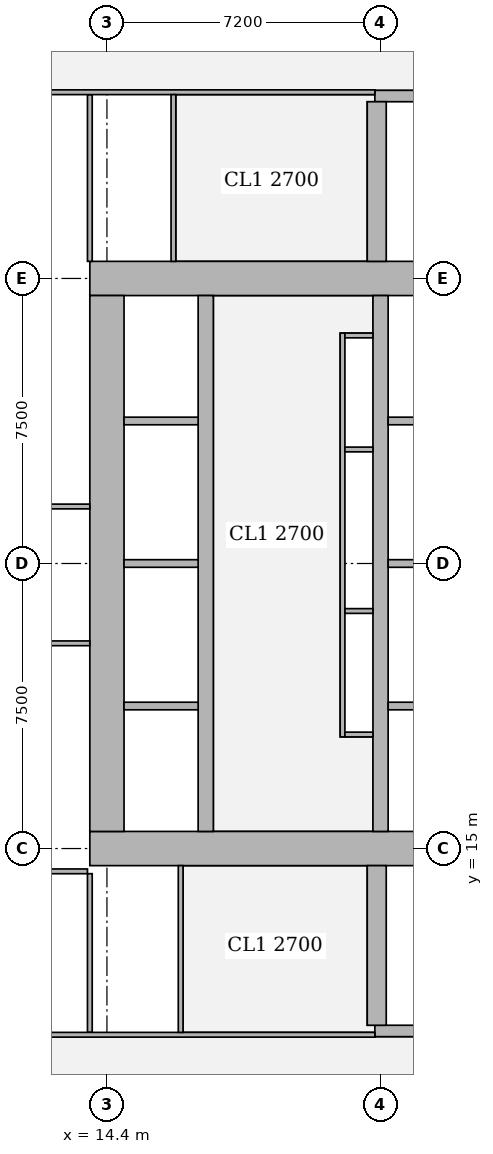
"""IFC4 building model, lengths in metres.
Left out: names, types, materials, properties, quantities, classifications, styles, units other than length and angle.
Written with IfcOpenShell. Run it as: python <this file> out.ifc"""

import sys

from ifc_helpers import new_model, si_unit, direction, frame, frame_2d, origin, place, context, subcontext, project, spatial, rectangle, extrude, element, fill, save


model = new_model("IFC4")
c1 = context("Model", 3, precision=1e-05, world=origin(), true_north=direction((0.0, 1.0)))
c2 = subcontext(c1, "Body", "Model", "MODEL_VIEW")
j1 = project(units=[si_unit("LENGTHUNIT", "METRE"), si_unit("PLANEANGLEUNIT", "RADIAN")], contexts=[c1])
p1 = place(None, origin())
s1 = spatial("IfcSite", under=j1, at=p1, CompositionType="ELEMENT")
p2 = place(p1, origin())
s2 = spatial("IfcBuilding", under=s1, at=p2, CompositionType="ELEMENT")
p3 = place(p2, frame((0.0, 0.0, 31.25)))
s3 = spatial("IfcBuildingStorey", under=s2, at=p3, CompositionType="ELEMENT", Elevation=31.25)
p4 = place(p3, frame((13.95, 15.0, 0.0), z_axis=(0.0, 0.0, 1.0), x_axis=(1.0, 0.0, 0.0)))
e1 = element("IfcWall", 1, at=p4, inside=s3, PredefinedType="SHEAR", context=c2, shape_type="SweptSolid", body=[
    extrude(rectangle(XDim=15.3, YDim=0.9, at=frame_2d((7.65, 0.0))), origin(), (0.0, 0.0, 1.0), 3.75),
])
p5 = place(p4, frame((4.45, 0.0, 0.0)))
e2 = element("IfcOpeningElement", 2, at=p5, cuts=e1, PredefinedType="OPENING", context=c2, shape_type="SweptSolid", body=[
    extrude(rectangle(XDim=1.8, YDim=2.1, at=frame_2d((0.9, 1.05))), frame((0.0, 0.46, 0.0), z_axis=(0.0, -1.0, 0.0), x_axis=(1.0, 0.0, 0.0)), (0.0, 0.0, 1.0), 0.92),
])
p6 = place(p4, frame((10.7, 0.0, 0.0)))
e3 = element("IfcOpeningElement", 3, at=p6, cuts=e1, PredefinedType="OPENING", context=c2, shape_type="SweptSolid", body=[
    extrude(rectangle(XDim=1.1, YDim=2.1, at=frame_2d((0.55, 1.05))), frame((0.0, 0.46, 0.0), z_axis=(0.0, -1.0, 0.0), x_axis=(1.0, 0.0, 0.0)), (0.0, 0.0, 1.0), 0.92),
])
p7 = place(p3, frame((13.95, 30.0, 0.0), z_axis=(0.0, 0.0, 1.0), x_axis=(1.0, 0.0, 0.0)))
e4 = element("IfcWall", 4, at=p7, inside=s3, PredefinedType="SHEAR", context=c2, shape_type="SweptSolid", body=[
    extrude(rectangle(XDim=15.3, YDim=0.9, at=frame_2d((7.65, 0.0))), origin(), (0.0, 0.0, 1.0), 3.75),
])
p8 = place(p7, frame((4.45, 0.0, 0.0)))
e5 = element("IfcOpeningElement", 5, at=p8, cuts=e4, PredefinedType="OPENING", context=c2, shape_type="SweptSolid", body=[
    extrude(rectangle(XDim=1.8, YDim=2.1, at=frame_2d((0.9, 1.05))), frame((0.0, 0.46, 0.0), z_axis=(0.0, -1.0, 0.0), x_axis=(1.0, 0.0, 0.0)), (0.0, 0.0, 1.0), 0.92),
])
p9 = place(p7, frame((10.7, 0.0, 0.0)))
e6 = element("IfcOpeningElement", 6, at=p9, cuts=e4, PredefinedType="OPENING", context=c2, shape_type="SweptSolid", body=[
    extrude(rectangle(XDim=1.1, YDim=2.1, at=frame_2d((0.55, 1.05))), frame((0.0, 0.46, 0.0), z_axis=(0.0, -1.0, 0.0), x_axis=(1.0, 0.0, 0.0)), (0.0, 0.0, 1.0), 0.92),
])
p10 = place(p3, frame((14.4, 15.45, 0.0), z_axis=(0.0, 0.0, 1.0), x_axis=(0.0, 1.0, 0.0)))
e7 = element("IfcWall", 7, at=p10, inside=s3, PredefinedType="SHEAR", context=c2, shape_type="SweptSolid", body=[
    extrude(rectangle(XDim=14.1, YDim=0.9, at=frame_2d((7.05, 0.0))), origin(), (0.0, 0.0, 1.0), 3.75),
])
p11 = place(p3, frame((17.0, 15.45, 0.0), z_axis=(0.0, 0.0, 1.0), x_axis=(0.0, 1.0, 0.0)))
e8 = element("IfcWall", 8, at=p11, inside=s3, PredefinedType="SHEAR", context=c2, shape_type="SweptSolid", body=[
    extrude(rectangle(XDim=14.1, YDim=0.4, at=frame_2d((7.05, 0.0))), origin(), (0.0, 0.0, 1.0), 3.75),
])
p12 = place(p11, frame((0.875, 0.0, 0.0)))
e9 = element("IfcOpeningElement", 9, at=p12, cuts=e8, PredefinedType="OPENING", context=c2, shape_type="SweptSolid", body=[
    extrude(rectangle(XDim=1.1, YDim=2.1, at=frame_2d((0.55, 1.05))), frame((0.0, 0.21, 0.0), z_axis=(0.0, -1.0, 0.0), x_axis=(1.0, 0.0, 0.0)), (0.0, 0.0, 1.0), 0.42),
])
p13 = place(p11, frame((4.625, 0.0, 0.0)))
e10 = element("IfcOpeningElement", 10, at=p13, cuts=e8, PredefinedType="OPENING", context=c2, shape_type="SweptSolid", body=[
    extrude(rectangle(XDim=1.1, YDim=2.1, at=frame_2d((0.55, 1.05))), frame((0.0, 0.21, 0.0), z_axis=(0.0, -1.0, 0.0), x_axis=(1.0, 0.0, 0.0)), (0.0, 0.0, 1.0), 0.42),
])
p14 = place(p11, frame((8.375, 0.0, 0.0)))
e11 = element("IfcOpeningElement", 11, at=p14, cuts=e8, PredefinedType="OPENING", context=c2, shape_type="SweptSolid", body=[
    extrude(rectangle(XDim=1.1, YDim=2.1, at=frame_2d((0.55, 1.05))), frame((0.0, 0.21, 0.0), z_axis=(0.0, -1.0, 0.0), x_axis=(1.0, 0.0, 0.0)), (0.0, 0.0, 1.0), 0.42),
])
p15 = place(p11, frame((12.125, 0.0, 0.0)))
e12 = element("IfcOpeningElement", 12, at=p15, cuts=e8, PredefinedType="OPENING", context=c2, shape_type="SweptSolid", body=[
    extrude(rectangle(XDim=1.1, YDim=2.1, at=frame_2d((0.55, 1.05))), frame((0.0, 0.21, 0.0), z_axis=(0.0, -1.0, 0.0), x_axis=(1.0, 0.0, 0.0)), (0.0, 0.0, 1.0), 0.42),
])
p16 = place(p3, frame((21.6, 15.45, 0.0), z_axis=(0.0, 0.0, 1.0), x_axis=(0.0, 1.0, 0.0)))
e13 = element("IfcWall", 13, at=p16, inside=s3, PredefinedType="SHEAR", context=c2, shape_type="SweptSolid", body=[
    extrude(rectangle(XDim=14.1, YDim=0.4, at=frame_2d((7.05, 0.0))), origin(), (0.0, 0.0, 1.0), 3.75),
])
p17 = place(p3, frame((21.45, 10.2, 0.0), z_axis=(0.0, 0.0, 1.0), x_axis=(1.0, 0.0, 0.0)))
e14 = element("IfcWall", 14, at=p17, inside=s3, PredefinedType="SHEAR", context=c2, shape_type="SweptSolid", body=[
    extrude(rectangle(XDim=7.5, YDim=0.3, at=frame_2d((3.75, 0.0))), origin(), (0.0, 0.0, 1.0), 3.75),
])
p18 = place(p17, frame((0.5, 0.0, 0.0)))
e15 = element("IfcOpeningElement", 15, at=p18, cuts=e14, PredefinedType="OPENING", context=c2, shape_type="SweptSolid", body=[
    extrude(rectangle(XDim=1.1, YDim=2.1, at=frame_2d((0.55, 1.05))), frame((0.0, 0.16, 0.0), z_axis=(0.0, -1.0, 0.0), x_axis=(1.0, 0.0, 0.0)), (0.0, 0.0, 1.0), 0.32),
])
p19 = place(p3, frame((21.5, 10.35, 0.0), z_axis=(0.0, 0.0, 1.0), x_axis=(0.0, 1.0, 0.0)))
e16 = element("IfcWall", 16, at=p19, inside=s3, PredefinedType="SHEAR", context=c2, shape_type="SweptSolid", body=[
    extrude(rectangle(XDim=4.2, YDim=0.5, at=frame_2d((2.1, 0.0))), origin(), (0.0, 0.0, 1.0), 3.75),
])
p20 = place(p3, frame((21.45, 34.8, 0.0), z_axis=(0.0, 0.0, 1.0), x_axis=(1.0, 0.0, 0.0)))
e17 = element("IfcWall", 17, at=p20, inside=s3, PredefinedType="SHEAR", context=c2, shape_type="SweptSolid", body=[
    extrude(rectangle(XDim=7.5, YDim=0.3, at=frame_2d((3.75, 0.0))), origin(), (0.0, 0.0, 1.0), 3.75),
])
p21 = place(p20, frame((0.5, 0.0, 0.0)))
e18 = element("IfcOpeningElement", 18, at=p21, cuts=e17, PredefinedType="OPENING", context=c2, shape_type="SweptSolid", body=[
    extrude(rectangle(XDim=1.1, YDim=2.1, at=frame_2d((0.55, 1.05))), frame((0.0, 0.16, 0.0), z_axis=(0.0, -1.0, 0.0), x_axis=(1.0, 0.0, 0.0)), (0.0, 0.0, 1.0), 0.32),
])
p22 = place(p3, frame((21.5, 30.45, 0.0), z_axis=(0.0, 0.0, 1.0), x_axis=(0.0, 1.0, 0.0)))
e19 = element("IfcWall", 19, at=p22, inside=s3, PredefinedType="SHEAR", context=c2, shape_type="SweptSolid", body=[
    extrude(rectangle(XDim=4.2, YDim=0.5, at=frame_2d((2.1, 0.0))), origin(), (0.0, 0.0, 1.0), 3.75),
])
p23 = place(p3, frame((10.163, 14.4, 0.0), z_axis=(0.0, 0.0, 1.0), x_axis=(1.0, 0.0, 0.0)))
e20 = element("IfcWall", 20, at=p23, inside=s3, PredefinedType="PARTITIONING", context=c2, shape_type="SweptSolid", body=[
    extrude(rectangle(XDim=3.725, YDim=0.125, at=frame_2d((1.862, 0.0))), origin(), (0.0, 0.0, 1.0), 3.5),
])
for number, where, z_axis, x_axis in (
    (21, (10.163, 20.4, 0.0), (0.0, 0.0, 1.0), (1.0, 0.0, 0.0)),
    (22, (10.163, 24.0, 0.0), (0.0, 0.0, 1.0), (1.0, 0.0, 0.0)),
):
    element("IfcWall", number, at=place(p3, frame(where, z_axis=z_axis, x_axis=x_axis)), inside=s3, PredefinedType="PARTITIONING", context=c2, shape_type="SweptSolid", body=[
        extrude(rectangle(XDim=3.787, YDim=0.125, at=frame_2d((1.894, 0.0))), origin(), (0.0, 0.0, 1.0), 3.5),
    ])
p24 = place(p3, frame((13.95, 10.163, 0.0), z_axis=(0.0, 0.0, 1.0), x_axis=(0.0, 1.0, 0.0)))
e23 = element("IfcWall", 23, at=p24, inside=s3, PredefinedType="PARTITIONING", context=c2, shape_type="SweptSolid", body=[
    extrude(rectangle(XDim=4.175, YDim=0.125, at=frame_2d((2.087, 0.0))), origin(), (0.0, 0.0, 1.0), 3.5),
])
p25 = place(p3, frame((13.95, 30.45, 0.0), z_axis=(0.0, 0.0, 1.0), x_axis=(0.0, 1.0, 0.0)))
e24 = element("IfcWall", 24, at=p25, inside=s3, PredefinedType="PARTITIONING", context=c2, shape_type="SweptSolid", body=[
    extrude(rectangle(XDim=4.387, YDim=0.125, at=frame_2d((2.193, 0.0))), origin(), (0.0, 0.0, 1.0), 3.5),
])
p26 = place(p3, frame((10.163, 10.1, 0.0), z_axis=(0.0, 0.0, 1.0), x_axis=(1.0, 0.0, 0.0)))
e25 = element("IfcWall", 25, at=p26, inside=s3, PredefinedType="PARTITIONING", context=c2, shape_type="SweptSolid", body=[
    extrude(rectangle(XDim=11.287, YDim=0.125, at=frame_2d((5.644, 0.0))), origin(), (0.0, 0.0, 1.0), 3.5),
])
p27 = place(p26, frame((7.832, 0.0, 0.0)))
e26 = element("IfcOpeningElement", 26, at=p27, cuts=e25, PredefinedType="OPENING", context=c2, shape_type="SweptSolid", body=[
    extrude(rectangle(XDim=1.8, YDim=2.1, at=frame_2d((0.9, 1.05))), frame((0.0, 0.073, 0.0), z_axis=(0.0, -1.0, 0.0), x_axis=(1.0, 0.0, 0.0)), (0.0, 0.0, 1.0), 0.145),
])
p28 = place(p3, frame((10.163, 34.9, 0.0), z_axis=(0.0, 0.0, 1.0), x_axis=(1.0, 0.0, 0.0)))
e27 = element("IfcWall", 27, at=p28, inside=s3, PredefinedType="PARTITIONING", context=c2, shape_type="SweptSolid", body=[
    extrude(rectangle(XDim=11.287, YDim=0.125, at=frame_2d((5.644, 0.0))), origin(), (0.0, 0.0, 1.0), 3.5),
])
p29 = place(p28, frame((7.737, 0.0, 0.0)))
e28 = element("IfcOpeningElement", 28, at=p29, cuts=e27, PredefinedType="OPENING", context=c2, shape_type="SweptSolid", body=[
    extrude(rectangle(XDim=1.8, YDim=2.1, at=frame_2d((0.9, 1.05))), frame((0.0, 0.073, 0.0), z_axis=(0.0, -1.0, 0.0), x_axis=(1.0, 0.0, 0.0)), (0.0, 0.0, 1.0), 0.145),
])
p30 = place(p3, frame((16.34, 10.163, 0.0), z_axis=(0.0, 0.0, 1.0), x_axis=(0.0, 1.0, 0.0)))
e29 = element("IfcWall", 29, at=p30, inside=s3, PredefinedType="PARTITIONING", context=c2, shape_type="SweptSolid", body=[
    extrude(rectangle(XDim=4.387, YDim=0.125, at=frame_2d((2.193, 0.0))), origin(), (0.0, 0.0, 1.0), 3.5),
])
p31 = place(p30, frame((1.637, 0.0, 0.0)))
e30 = element("IfcOpeningElement", 30, at=p31, cuts=e29, PredefinedType="OPENING", context=c2, shape_type="SweptSolid", body=[
    extrude(rectangle(XDim=1.0, YDim=2.1, at=frame_2d((0.5, 1.05))), frame((0.0, 0.073, 0.0), z_axis=(0.0, -1.0, 0.0), x_axis=(1.0, 0.0, 0.0)), (0.0, 0.0, 1.0), 0.145),
])
p32 = place(p3, frame((16.15, 30.45, 0.0), z_axis=(0.0, 0.0, 1.0), x_axis=(0.0, 1.0, 0.0)))
e31 = element("IfcWall", 31, at=p32, inside=s3, PredefinedType="PARTITIONING", context=c2, shape_type="SweptSolid", body=[
    extrude(rectangle(XDim=4.387, YDim=0.125, at=frame_2d((2.193, 0.0))), origin(), (0.0, 0.0, 1.0), 3.5),
])
p33 = place(p32, frame((1.75, 0.0, 0.0)))
e32 = element("IfcOpeningElement", 32, at=p33, cuts=e31, PredefinedType="OPENING", context=c2, shape_type="SweptSolid", body=[
    extrude(rectangle(XDim=1.0, YDim=2.1, at=frame_2d((0.5, 1.05))), frame((0.0, 0.073, 0.0), z_axis=(0.0, -1.0, 0.0), x_axis=(1.0, 0.0, 0.0)), (0.0, 0.0, 1.0), 0.145),
])
p34 = place(p3, frame((20.6, 17.938, 0.0), z_axis=(0.0, 0.0, 1.0), x_axis=(0.0, 1.0, 0.0)))
e33 = element("IfcWall", 33, at=p34, inside=s3, PredefinedType="PARTITIONING", context=c2, shape_type="SweptSolid", body=[
    extrude(rectangle(XDim=10.624, YDim=0.125, at=frame_2d((5.312, 0.0))), origin(), (0.0, 0.0, 1.0), 3.5),
])
p35 = place(p34, frame((1.187, 0.0, 0.0)))
e34 = element("IfcOpeningElement", 34, at=p35, cuts=e33, PredefinedType="OPENING", context=c2, shape_type="SweptSolid", body=[
    extrude(rectangle(XDim=1.0, YDim=2.1, at=frame_2d((0.5, 1.05))), frame((0.0, 0.073, 0.0), z_axis=(0.0, -1.0, 0.0), x_axis=(1.0, 0.0, 0.0)), (0.0, 0.0, 1.0), 0.145),
])
p36 = place(p34, frame((4.937, 0.0, 0.0)))
e35 = element("IfcOpeningElement", 35, at=p36, cuts=e33, PredefinedType="OPENING", context=c2, shape_type="SweptSolid", body=[
    extrude(rectangle(XDim=1.0, YDim=2.1, at=frame_2d((0.5, 1.05))), frame((0.0, 0.073, 0.0), z_axis=(0.0, -1.0, 0.0), x_axis=(1.0, 0.0, 0.0)), (0.0, 0.0, 1.0), 0.145),
])
p37 = place(p34, frame((8.562, 0.0, 0.0)))
e36 = element("IfcOpeningElement", 36, at=p37, cuts=e33, PredefinedType="OPENING", context=c2, shape_type="SweptSolid", body=[
    extrude(rectangle(XDim=1.0, YDim=2.1, at=frame_2d((0.5, 1.05))), frame((0.0, 0.073, 0.0), z_axis=(0.0, -1.0, 0.0), x_axis=(1.0, 0.0, 0.0)), (0.0, 0.0, 1.0), 0.145),
])
for number, where, z_axis, x_axis in (
    (37, (20.663, 18.0, 0.0), (0.0, 0.0, 1.0), (1.0, 0.0, 0.0)),
    (38, (20.663, 28.5, 0.0), (0.0, 0.0, 1.0), (1.0, 0.0, 0.0)),
    (39, (20.663, 21.25, 0.0), (0.0, 0.0, 1.0), (1.0, 0.0, 0.0)),
    (40, (20.663, 25.5, 0.0), (0.0, 0.0, 1.0), (1.0, 0.0, 0.0)),
):
    element("IfcWall", number, at=place(p3, frame(where, z_axis=z_axis, x_axis=x_axis)), inside=s3, PredefinedType="PARTITIONING", context=c2, shape_type="SweptSolid", body=[
        extrude(rectangle(XDim=0.737, YDim=0.125, at=frame_2d((0.368, 0.0))), origin(), (0.0, 0.0, 1.0), 3.5),
    ])
p38 = place(p3, frame((14.85, 18.75, 0.0), z_axis=(0.0, 0.0, 1.0), x_axis=(1.0, 0.0, 0.0)))
e41 = element("IfcWall", 41, at=p38, inside=s3, PredefinedType="SOLIDWALL", context=c2, shape_type="SweptSolid", body=[
    extrude(rectangle(XDim=1.95, YDim=0.2, at=frame_2d((0.975, 0.0))), origin(), (0.0, 0.0, 1.0), 3.5),
])
p39 = place(p3, frame((21.8, 18.75, 0.0), z_axis=(0.0, 0.0, 1.0), x_axis=(1.0, 0.0, 0.0)))
e42 = element("IfcWall", 42, at=p39, inside=s3, PredefinedType="SOLIDWALL", context=c2, shape_type="SweptSolid", body=[
    extrude(rectangle(XDim=2.2, YDim=0.2, at=frame_2d((1.1, 0.0))), origin(), (0.0, 0.0, 1.0), 3.5),
])
p40 = place(p3, frame((14.85, 22.5, 0.0), z_axis=(0.0, 0.0, 1.0), x_axis=(1.0, 0.0, 0.0)))
e43 = element("IfcWall", 43, at=p40, inside=s3, PredefinedType="SOLIDWALL", context=c2, shape_type="SweptSolid", body=[
    extrude(rectangle(XDim=1.95, YDim=0.2, at=frame_2d((0.975, 0.0))), origin(), (0.0, 0.0, 1.0), 3.5),
])
p41 = place(p3, frame((21.8, 22.5, 0.0), z_axis=(0.0, 0.0, 1.0), x_axis=(1.0, 0.0, 0.0)))
e44 = element("IfcWall", 44, at=p41, inside=s3, PredefinedType="SOLIDWALL", context=c2, shape_type="SweptSolid", body=[
    extrude(rectangle(XDim=2.2, YDim=0.2, at=frame_2d((1.1, 0.0))), origin(), (0.0, 0.0, 1.0), 3.5),
])
p42 = place(p3, frame((14.85, 26.25, 0.0), z_axis=(0.0, 0.0, 1.0), x_axis=(1.0, 0.0, 0.0)))
e45 = element("IfcWall", 45, at=p42, inside=s3, PredefinedType="SOLIDWALL", context=c2, shape_type="SweptSolid", body=[
    extrude(rectangle(XDim=1.95, YDim=0.2, at=frame_2d((0.975, 0.0))), origin(), (0.0, 0.0, 1.0), 3.5),
])
p43 = place(p3, frame((21.8, 26.25, 0.0), z_axis=(0.0, 0.0, 1.0), x_axis=(1.0, 0.0, 0.0)))
e46 = element("IfcWall", 46, at=p43, inside=s3, PredefinedType="SOLIDWALL", context=c2, shape_type="SweptSolid", body=[
    extrude(rectangle(XDim=2.2, YDim=0.2, at=frame_2d((1.1, 0.0))), origin(), (0.0, 0.0, 1.0), 3.5),
])
p44 = place(p31, origin())
e47 = element("IfcDoor", 47, at=p44, inside=s3, OperationType="SINGLE_SWING_LEFT", PredefinedType="DOOR", context=c2, shape_type="SweptSolid", body=[
    extrude(rectangle(XDim=1.0, YDim=2.1, at=frame_2d((0.5, 1.05))), frame((0.0, 0.025, 0.0), z_axis=(0.0, -1.0, 0.0), x_axis=(1.0, 0.0, 0.0)), (0.0, 0.0, 1.0), 0.05),
])
fill(e30, e47)
p45 = place(p27, origin())
e48 = element("IfcDoor", 48, at=p45, inside=s3, OperationType="DOUBLE_DOOR_SINGLE_SWING", PredefinedType="DOOR", context=c2, shape_type="SweptSolid", body=[
    extrude(rectangle(XDim=1.8, YDim=2.1, at=frame_2d((0.9, 1.05))), frame((0.0, 0.025, 0.0), z_axis=(0.0, -1.0, 0.0), x_axis=(1.0, 0.0, 0.0)), (0.0, 0.0, 1.0), 0.05),
])
fill(e26, e48)
p46 = place(p33, origin())
e49 = element("IfcDoor", 49, at=p46, inside=s3, OperationType="SINGLE_SWING_RIGHT", PredefinedType="DOOR", context=c2, shape_type="SweptSolid", body=[
    extrude(rectangle(XDim=1.0, YDim=2.1, at=frame_2d((0.5, 1.05))), frame((0.0, 0.025, 0.0), z_axis=(0.0, -1.0, 0.0), x_axis=(1.0, 0.0, 0.0)), (0.0, 0.0, 1.0), 0.05),
])
fill(e32, e49)
p47 = place(p29, origin())
e50 = element("IfcDoor", 50, at=p47, inside=s3, OperationType="DOUBLE_DOOR_SINGLE_SWING", PredefinedType="DOOR", context=c2, shape_type="SweptSolid", body=[
    extrude(rectangle(XDim=1.8, YDim=2.1, at=frame_2d((0.9, 1.05))), frame((0.0, 0.025, 0.0), z_axis=(0.0, -1.0, 0.0), x_axis=(1.0, 0.0, 0.0)), (0.0, 0.0, 1.0), 0.05),
])
fill(e28, e50)
p48 = place(p35, origin())
e51 = element("IfcDoor", 51, at=p48, inside=s3, OperationType="SINGLE_SWING_LEFT", PredefinedType="DOOR", context=c2, shape_type="SweptSolid", body=[
    extrude(rectangle(XDim=1.0, YDim=2.1, at=frame_2d((0.5, 1.05))), frame((0.0, 0.025, 0.0), z_axis=(0.0, -1.0, 0.0), x_axis=(1.0, 0.0, 0.0)), (0.0, 0.0, 1.0), 0.05),
])
fill(e34, e51)
p49 = place(p36, origin())
e52 = element("IfcDoor", 52, at=p49, inside=s3, OperationType="SINGLE_SWING_RIGHT", PredefinedType="DOOR", context=c2, shape_type="SweptSolid", body=[
    extrude(rectangle(XDim=1.0, YDim=2.1, at=frame_2d((0.5, 1.05))), frame((0.0, 0.025, 0.0), z_axis=(0.0, -1.0, 0.0), x_axis=(1.0, 0.0, 0.0)), (0.0, 0.0, 1.0), 0.05),
])
fill(e35, e52)
p50 = place(p37, origin())
e53 = element("IfcDoor", 53, at=p50, inside=s3, OperationType="SINGLE_SWING_RIGHT", PredefinedType="DOOR", context=c2, shape_type="SweptSolid", body=[
    extrude(rectangle(XDim=1.0, YDim=2.1, at=frame_2d((0.5, 1.05))), frame((0.0, 0.025, 0.0), z_axis=(0.0, -1.0, 0.0), x_axis=(1.0, 0.0, 0.0)), (0.0, 0.0, 1.0), 0.05),
])
fill(e36, e53)
p51 = place(p5, origin())
e54 = element("IfcDoor", 54, at=p51, inside=s3, OperationType="DOUBLE_DOOR_SINGLE_SWING", PredefinedType="DOOR", context=c2, shape_type="SweptSolid", body=[
    extrude(rectangle(XDim=1.8, YDim=2.1, at=frame_2d((0.9, 1.05))), frame((0.0, 0.025, 0.0), z_axis=(0.0, -1.0, 0.0), x_axis=(1.0, 0.0, 0.0)), (0.0, 0.0, 1.0), 0.05),
])
fill(e2, e54)
p52 = place(p8, origin())
e55 = element("IfcDoor", 55, at=p52, inside=s3, OperationType="DOUBLE_DOOR_SINGLE_SWING", PredefinedType="DOOR", context=c2, shape_type="SweptSolid", body=[
    extrude(rectangle(XDim=1.8, YDim=2.1, at=frame_2d((0.9, 1.05))), frame((0.0, 0.025, 0.0), z_axis=(0.0, -1.0, 0.0), x_axis=(1.0, 0.0, 0.0)), (0.0, 0.0, 1.0), 0.05),
])
fill(e5, e55)
p53 = place(p12, origin())
e56 = element("IfcDoor", 56, at=p53, inside=s3, OperationType="DOUBLE_DOOR_SLIDING", PredefinedType="DOOR", context=c2, shape_type="SweptSolid", body=[
    extrude(rectangle(XDim=1.1, YDim=2.1, at=frame_2d((0.55, 1.05))), frame((0.0, 0.025, 0.0), z_axis=(0.0, -1.0, 0.0), x_axis=(1.0, 0.0, 0.0)), (0.0, 0.0, 1.0), 0.05),
])
fill(e9, e56)
p54 = place(p13, origin())
e57 = element("IfcDoor", 57, at=p54, inside=s3, OperationType="DOUBLE_DOOR_SLIDING", PredefinedType="DOOR", context=c2, shape_type="SweptSolid", body=[
    extrude(rectangle(XDim=1.1, YDim=2.1, at=frame_2d((0.55, 1.05))), frame((0.0, 0.025, 0.0), z_axis=(0.0, -1.0, 0.0), x_axis=(1.0, 0.0, 0.0)), (0.0, 0.0, 1.0), 0.05),
])
fill(e10, e57)
p55 = place(p14, origin())
e58 = element("IfcDoor", 58, at=p55, inside=s3, OperationType="DOUBLE_DOOR_SLIDING", PredefinedType="DOOR", context=c2, shape_type="SweptSolid", body=[
    extrude(rectangle(XDim=1.1, YDim=2.1, at=frame_2d((0.55, 1.05))), frame((0.0, 0.025, 0.0), z_axis=(0.0, -1.0, 0.0), x_axis=(1.0, 0.0, 0.0)), (0.0, 0.0, 1.0), 0.05),
])
fill(e11, e58)
p56 = place(p15, origin())
e59 = element("IfcDoor", 59, at=p56, inside=s3, OperationType="DOUBLE_DOOR_SLIDING", PredefinedType="DOOR", context=c2, shape_type="SweptSolid", body=[
    extrude(rectangle(XDim=1.1, YDim=2.1, at=frame_2d((0.55, 1.05))), frame((0.0, 0.025, 0.0), z_axis=(0.0, -1.0, 0.0), x_axis=(1.0, 0.0, 0.0)), (0.0, 0.0, 1.0), 0.05),
])
fill(e12, e59)
p57 = place(p18, origin())
e60 = element("IfcDoor", 60, at=p57, inside=s3, OperationType="SINGLE_SWING_LEFT", PredefinedType="DOOR", context=c2, shape_type="SweptSolid", body=[
    extrude(rectangle(XDim=1.1, YDim=2.1, at=frame_2d((0.55, 1.05))), frame((0.0, 0.025, 0.0), z_axis=(0.0, -1.0, 0.0), x_axis=(1.0, 0.0, 0.0)), (0.0, 0.0, 1.0), 0.05),
])
fill(e15, e60)
p58 = place(p21, origin())
e61 = element("IfcDoor", 61, at=p58, inside=s3, OperationType="SINGLE_SWING_RIGHT", PredefinedType="DOOR", context=c2, shape_type="SweptSolid", body=[
    extrude(rectangle(XDim=1.1, YDim=2.1, at=frame_2d((0.55, 1.05))), frame((0.0, 0.025, 0.0), z_axis=(0.0, -1.0, 0.0), x_axis=(1.0, 0.0, 0.0)), (0.0, 0.0, 1.0), 0.05),
])
fill(e18, e61)
save(model, sys.argv[1])
